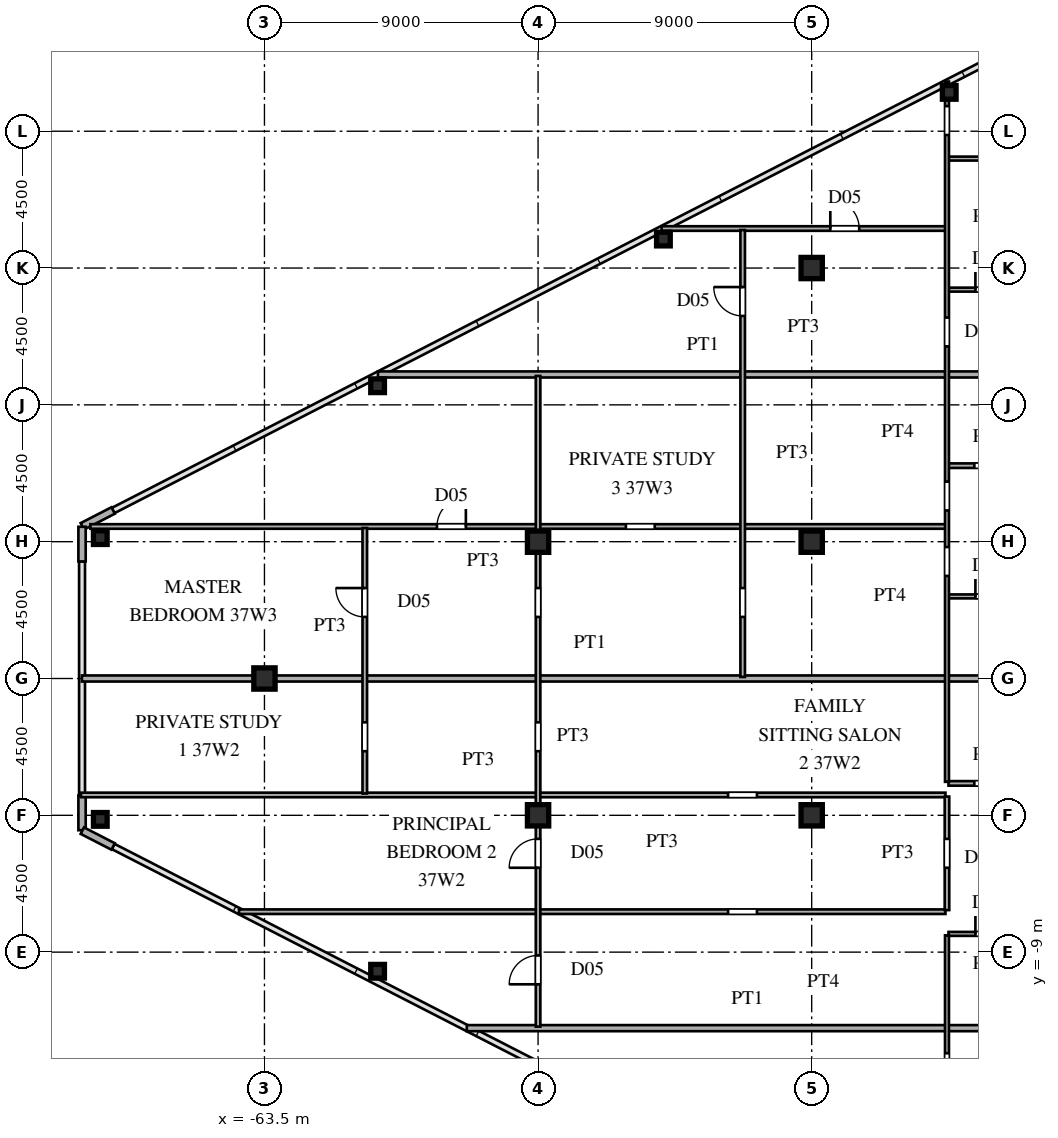
"""IFC4 building model, lengths in metres.
Left out: names, types, materials, properties, quantities, classifications, styles, units other than length and angle.
Written with IfcOpenShell. Run it as: python <this file> out.ifc"""

import sys

from ifc_helpers import new_model, si_unit, direction, frame, frame_2d, origin, origin_2d, place, context, subcontext, project, spatial, rectangle, hollow_rectangle, i_section, extrude, source, transform, mapped, element, fill, save


model = new_model("IFC4")
c1 = context("Model", 3, precision=1e-05, world=origin(), true_north=direction((0.0, 1.0)))
c2 = subcontext(c1, "Body", "Model", "MODEL_VIEW")
j1 = project(units=[si_unit("LENGTHUNIT", "METRE"), si_unit("PLANEANGLEUNIT", "RADIAN")], contexts=[c1])
p1 = place(None, origin())
s1 = spatial("IfcSite", under=j1, at=p1, CompositionType="ELEMENT")
p2 = place(p1, origin())
s2 = spatial("IfcBuilding", under=s1, at=p2, CompositionType="ELEMENT")
p3 = place(p2, frame((0.0, 0.0, 140.4)))
s3 = spatial("IfcBuildingStorey", under=s2, at=p3, CompositionType="ELEMENT", Elevation=140.4)
m1 = source(origin(), c2, "Body", "SweptSolid", [
    extrude(i_section(OverallWidth=0.7, OverallDepth=0.7, WebThickness=0.028, FlangeThickness=0.045, at=origin_2d()), origin(), (0.0, 0.0, 1.0), 3.6),
])
for number, where, z_axis, x_axis in (
    (1, (-45.5, -4.5, 0.0), (0.0, 0.0, 1.0), (1.0, 0.0, 0.0)),
    (2, (-45.5, 4.5, 0.0), (0.0, 0.0, 1.0), (1.0, 0.0, 0.0)),
    (3, (-45.5, 13.5, 0.0), (0.0, 0.0, 1.0), (1.0, 0.0, 0.0)),
    (4, (-54.5, -4.5, 0.0), (0.0, 0.0, 1.0), (1.0, 0.0, 0.0)),
    (5, (-54.5, 4.5, 0.0), (0.0, 0.0, 1.0), (1.0, 0.0, 0.0)),
    (6, (-63.5, 0.0, 0.0), (0.0, 0.0, 1.0), (1.0, 0.0, 0.0)),
):
    element("IfcColumn", number, at=place(p3, frame(where, z_axis=z_axis, x_axis=x_axis)), inside=s3, PredefinedType="COLUMN", context=c2, shape_type="MappedRepresentation", body=[
        mapped(m1, transform((0.0, 0.0, 0.0), scale=1.0)),
    ])
m2 = source(origin(), c2, "Body", "SweptSolid", [
    extrude(hollow_rectangle(XDim=0.45, YDim=0.45, WallThickness=0.018, at=origin_2d()), origin(), (0.0, 0.0, 1.0), 3.6),
])
for number, where, z_axis, x_axis in (
    (7, (-68.9, 4.634, 0.0), (0.0, 0.0, 1.0), (1.0, 0.0, 0.0)),
    (8, (-68.9, -4.634, 0.0), (0.0, 0.0, 1.0), (1.0, 0.0, 0.0)),
    (9, (-59.779, -9.629, 0.0), (0.0, 0.0, 1.0), (1.0, 0.0, 0.0)),
    (10, (-40.976, 19.278, 0.0), (0.0, 0.0, 1.0), (1.0, 0.0, 0.0)),
    (11, (-50.377, 14.453, 0.0), (0.0, 0.0, 1.0), (1.0, 0.0, 0.0)),
    (12, (-59.779, 9.629, 0.0), (0.0, 0.0, 1.0), (1.0, 0.0, 0.0)),
):
    element("IfcColumn", number, at=place(p3, frame(where, z_axis=z_axis, x_axis=x_axis)), inside=s3, PredefinedType="COLUMN", context=c2, shape_type="MappedRepresentation", body=[
        mapped(m2, transform((0.0, 0.0, 0.0), scale=1.0)),
    ])
p4 = place(p3, frame((-68.477, 5.525, 0.0), z_axis=(0.0, 0.0, 1.0), x_axis=(-0.889797395748, -0.456355776255, 0.0)))
e13 = element("IfcWall", 13, at=p4, inside=s3, PredefinedType="SOLIDWALL", context=c2, shape_type="SweptSolid", body=[
    extrude(rectangle(XDim=1.14, YDim=0.24, at=frame_2d((0.57, 0.0))), origin(), (0.0, 0.0, 1.0), 3.38),
])
for number, where, z_axis, x_axis in (
    (14, (-69.5, 4.99, 0.0), (0.0, 0.0, 1.0), (0.0, -1.0, 0.0)),
    (15, (-69.5, -3.85, 0.0), (0.0, 0.0, 1.0), (0.0, -1.0, 0.0)),
):
    element("IfcWall", number, at=place(p3, frame(where, z_axis=z_axis, x_axis=x_axis)), inside=s3, PredefinedType="SOLIDWALL", context=c2, shape_type="SweptSolid", body=[
        extrude(rectangle(XDim=1.14, YDim=0.24, at=frame_2d((0.57, 0.0))), origin(), (0.0, 0.0, 1.0), 3.38),
    ])
p5 = place(p3, frame((-69.491, -5.005, 0.0), z_axis=(0.0, 0.0, 1.0), x_axis=(0.889797395748, -0.456355776255, 0.0)))
e16 = element("IfcWall", 16, at=p5, inside=s3, PredefinedType="SOLIDWALL", context=c2, shape_type="SweptSolid", body=[
    extrude(rectangle(XDim=1.14, YDim=0.24, at=frame_2d((0.57, 0.0))), origin(), (0.0, 0.0, 1.0), 3.38),
])
p6 = place(p3, frame((-56.844, -11.5, 0.0), z_axis=(0.0, 0.0, 1.0), x_axis=(1.0, 0.0, 0.0)))
e17 = element("IfcWall", 17, at=p6, inside=s3, PredefinedType="PARTITIONING", context=c2, shape_type="SweptSolid", body=[
    extrude(rectangle(XDim=18.464, YDim=0.2, at=frame_2d((9.232, 0.0))), origin(), (0.0, 0.0, 1.0), 3.38),
])
p7 = place(p3, frame((-41.0, -8.4, 0.0), z_axis=(0.0, 0.0, 1.0), x_axis=(1.0, 0.0, 0.0)))
e18 = element("IfcWall", 18, at=p7, inside=s3, PredefinedType="PARTITIONING", context=c2, shape_type="SweptSolid", body=[
    extrude(rectangle(XDim=2.65, YDim=0.13, at=frame_2d((1.325, 0.0))), origin(), (0.0, 0.0, 1.0), 3.38),
])
p8 = place(p7, frame((0.885, 0.0, 0.0)))
e19 = element("IfcOpeningElement", 19, at=p8, cuts=e18, PredefinedType="OPENING", context=c2, shape_type="SweptSolid", body=[
    extrude(rectangle(XDim=0.88, YDim=2.1, at=frame_2d((0.44, 1.05))), frame((0.0, 0.075, 0.0), z_axis=(0.0, -1.0, 0.0), x_axis=(1.0, 0.0, 0.0)), (0.0, 0.0, 1.0), 0.15),
])
p9 = place(p3, frame((-64.338, -7.67, 0.0), z_axis=(0.0, 0.0, 1.0), x_axis=(1.0, 0.0, 0.0)))
e20 = element("IfcWall", 20, at=p9, inside=s3, PredefinedType="PARTITIONING", context=c2, shape_type="SweptSolid", body=[
    extrude(rectangle(XDim=23.238, YDim=0.15, at=frame_2d((11.619, 0.0))), origin(), (0.0, 0.0, 1.0), 3.38),
])
p10 = place(p9, frame((16.088, 0.0, 0.0)))
e21 = element("IfcOpeningElement", 21, at=p10, cuts=e20, PredefinedType="OPENING", context=c2, shape_type="SweptSolid", body=[
    extrude(rectangle(XDim=0.95, YDim=2.15, at=frame_2d((0.475, 1.075))), frame((0.0, 0.085, 0.0), z_axis=(0.0, -1.0, 0.0), x_axis=(1.0, 0.0, 0.0)), (0.0, 0.0, 1.0), 0.17),
])
p11 = place(p3, frame((-69.535, -3.83, 0.0), z_axis=(0.0, 0.0, 1.0), x_axis=(1.0, 0.0, 0.0)))
e22 = element("IfcWall", 22, at=p11, inside=s3, PredefinedType="PARTITIONING", context=c2, shape_type="SweptSolid", body=[
    extrude(rectangle(XDim=28.435, YDim=0.15, at=frame_2d((14.217, 0.0))), origin(), (0.0, 0.0, 1.0), 3.38),
])
p12 = place(p11, frame((21.285, 0.0, 0.0)))
e23 = element("IfcOpeningElement", 23, at=p12, cuts=e22, PredefinedType="OPENING", context=c2, shape_type="SweptSolid", body=[
    extrude(rectangle(XDim=0.95, YDim=2.15, at=frame_2d((0.475, 1.075))), frame((0.0, 0.085, 0.0), z_axis=(0.0, -1.0, 0.0), x_axis=(1.0, 0.0, 0.0)), (0.0, 0.0, 1.0), 0.17),
])
p13 = place(p3, frame((-41.0, -3.45, 0.0), z_axis=(0.0, 0.0, 1.0), x_axis=(1.0, 0.0, 0.0)))
e24 = element("IfcWall", 24, at=p13, inside=s3, PredefinedType="PARTITIONING", context=c2, shape_type="SweptSolid", body=[
    extrude(rectangle(XDim=2.65, YDim=0.15, at=frame_2d((1.325, 0.0))), origin(), (0.0, 0.0, 1.0), 3.38),
])
p14 = place(p13, frame((0.85, 0.0, 0.0)))
e25 = element("IfcOpeningElement", 25, at=p14, cuts=e24, PredefinedType="OPENING", context=c2, shape_type="SweptSolid", body=[
    extrude(rectangle(XDim=0.95, YDim=2.15, at=frame_2d((0.475, 1.075))), frame((0.0, 0.085, 0.0), z_axis=(0.0, -1.0, 0.0), x_axis=(1.0, 0.0, 0.0)), (0.0, 0.0, 1.0), 0.17),
])
p15 = place(p3, frame((-69.505, 0.0, 0.0), z_axis=(0.0, 0.0, 1.0), x_axis=(1.0, 0.0, 0.0)))
e26 = element("IfcWall", 26, at=p15, inside=s3, PredefinedType="PARTITIONING", context=c2, shape_type="SweptSolid", body=[
    extrude(rectangle(XDim=31.125, YDim=0.2, at=frame_2d((15.562, 0.0))), origin(), (0.0, 0.0, 1.0), 3.38),
])
p16 = place(p3, frame((-41.0, 2.7, 0.0), z_axis=(0.0, 0.0, 1.0), x_axis=(1.0, 0.0, 0.0)))
e27 = element("IfcWall", 27, at=p16, inside=s3, PredefinedType="PARTITIONING", context=c2, shape_type="SweptSolid", body=[
    extrude(rectangle(XDim=2.65, YDim=0.13, at=frame_2d((1.325, 0.0))), origin(), (0.0, 0.0, 1.0), 3.38),
])
p17 = place(p16, frame((0.885, 0.0, 0.0)))
e28 = element("IfcOpeningElement", 28, at=p17, cuts=e27, PredefinedType="OPENING", context=c2, shape_type="SweptSolid", body=[
    extrude(rectangle(XDim=0.88, YDim=2.1, at=frame_2d((0.44, 1.05))), frame((0.0, 0.075, 0.0), z_axis=(0.0, -1.0, 0.0), x_axis=(1.0, 0.0, 0.0)), (0.0, 0.0, 1.0), 0.15),
])
p18 = place(p3, frame((-69.226, 5.0, 0.0), z_axis=(0.0, 0.0, 1.0), x_axis=(1.0, 0.0, 0.0)))
e29 = element("IfcWall", 29, at=p18, inside=s3, PredefinedType="PARTITIONING", context=c2, shape_type="SweptSolid", body=[
    extrude(rectangle(XDim=28.126, YDim=0.15, at=frame_2d((14.063, 0.0))), origin(), (0.0, 0.0, 1.0), 3.38),
])
p19 = place(p18, frame((11.401, 0.0, 0.0)))
e30 = element("IfcOpeningElement", 30, at=p19, cuts=e29, PredefinedType="OPENING", context=c2, shape_type="SweptSolid", body=[
    extrude(rectangle(XDim=0.95, YDim=2.15, at=frame_2d((0.475, 1.075))), frame((0.0, 0.085, 0.0), z_axis=(0.0, -1.0, 0.0), x_axis=(1.0, 0.0, 0.0)), (0.0, 0.0, 1.0), 0.17),
])
p20 = place(p18, frame((17.614, 0.0, 0.0)))
e31 = element("IfcOpeningElement", 31, at=p20, cuts=e29, PredefinedType="OPENING", context=c2, shape_type="SweptSolid", body=[
    extrude(rectangle(XDim=0.95, YDim=2.15, at=frame_2d((0.475, 1.075))), frame((0.0, 0.085, 0.0), z_axis=(0.0, -1.0, 0.0), x_axis=(1.0, 0.0, 0.0)), (0.0, 0.0, 1.0), 0.17),
])
p21 = place(p3, frame((-41.0, 7.0, 0.0), z_axis=(0.0, 0.0, 1.0), x_axis=(1.0, 0.0, 0.0)))
e32 = element("IfcWall", 32, at=p21, inside=s3, PredefinedType="PARTITIONING", context=c2, shape_type="SweptSolid", body=[
    extrude(rectangle(XDim=2.65, YDim=0.15, at=frame_2d((1.325, 0.0))), origin(), (0.0, 0.0, 1.0), 3.38),
])
p22 = place(p21, frame((0.85, 0.0, 0.0)))
e33 = element("IfcOpeningElement", 33, at=p22, cuts=e32, PredefinedType="OPENING", context=c2, shape_type="SweptSolid", body=[
    extrude(rectangle(XDim=0.95, YDim=2.15, at=frame_2d((0.475, 1.075))), frame((0.0, 0.085, 0.0), z_axis=(0.0, -1.0, 0.0), x_axis=(1.0, 0.0, 0.0)), (0.0, 0.0, 1.0), 0.17),
])
p23 = place(p3, frame((-59.767, 10.0, 0.0), z_axis=(0.0, 0.0, 1.0), x_axis=(1.0, 0.0, 0.0)))
e34 = element("IfcWall", 34, at=p23, inside=s3, PredefinedType="PARTITIONING", context=c2, shape_type="SweptSolid", body=[
    extrude(rectangle(XDim=21.387, YDim=0.2, at=frame_2d((10.694, 0.0))), origin(), (0.0, 0.0, 1.0), 3.38),
])
p24 = place(p3, frame((-41.0, 12.79, 0.0), z_axis=(0.0, 0.0, 1.0), x_axis=(1.0, 0.0, 0.0)))
e35 = element("IfcWall", 35, at=p24, inside=s3, PredefinedType="PARTITIONING", context=c2, shape_type="SweptSolid", body=[
    extrude(rectangle(XDim=2.65, YDim=0.13, at=frame_2d((1.325, 0.0))), origin(), (0.0, 0.0, 1.0), 3.38),
])
p25 = place(p24, frame((0.885, 0.0, 0.0)))
e36 = element("IfcOpeningElement", 36, at=p25, cuts=e35, PredefinedType="OPENING", context=c2, shape_type="SweptSolid", body=[
    extrude(rectangle(XDim=0.88, YDim=2.1, at=frame_2d((0.44, 1.05))), frame((0.0, 0.075, 0.0), z_axis=(0.0, -1.0, 0.0), x_axis=(1.0, 0.0, 0.0)), (0.0, 0.0, 1.0), 0.15),
])
p26 = place(p3, frame((-50.438, 14.8, 0.0), z_axis=(0.0, 0.0, 1.0), x_axis=(1.0, 0.0, 0.0)))
e37 = element("IfcWall", 37, at=p26, inside=s3, PredefinedType="PARTITIONING", context=c2, shape_type="SweptSolid", body=[
    extrude(rectangle(XDim=9.338, YDim=0.15, at=frame_2d((4.669, 0.0))), origin(), (0.0, 0.0, 1.0), 3.38),
])
p27 = place(p26, frame((5.551, 0.0, 0.0)))
e38 = element("IfcOpeningElement", 38, at=p27, cuts=e37, PredefinedType="OPENING", context=c2, shape_type="SweptSolid", body=[
    extrude(rectangle(XDim=0.95, YDim=2.15, at=frame_2d((0.475, 1.075))), frame((0.0, 0.085, 0.0), z_axis=(0.0, -1.0, 0.0), x_axis=(1.0, 0.0, 0.0)), (0.0, 0.0, 1.0), 0.17),
])
p28 = place(p3, frame((-41.0, 17.1, 0.0), z_axis=(0.0, 0.0, 1.0), x_axis=(1.0, 0.0, 0.0)))
e39 = element("IfcWall", 39, at=p28, inside=s3, PredefinedType="PARTITIONING", context=c2, shape_type="SweptSolid", body=[
    extrude(rectangle(XDim=4.45, YDim=0.13, at=frame_2d((2.225, 0.0))), origin(), (0.0, 0.0, 1.0), 3.38),
])
p29 = place(p3, frame((-60.2, -3.783, 0.0), z_axis=(0.0, 0.0, 1.0), x_axis=(0.0, 1.0, 0.0)))
e40 = element("IfcWall", 40, at=p29, inside=s3, PredefinedType="PARTITIONING", context=c2, shape_type="SweptSolid", body=[
    extrude(rectangle(XDim=8.733, YDim=0.15, at=frame_2d((4.366, 0.0))), origin(), (0.0, 0.0, 1.0), 3.38),
])
p30 = place(p29, frame((1.391, 0.0, 0.0)))
e41 = element("IfcOpeningElement", 41, at=p30, cuts=e40, PredefinedType="OPENING", context=c2, shape_type="SweptSolid", body=[
    extrude(rectangle(XDim=0.95, YDim=2.15, at=frame_2d((0.475, 1.075))), frame((0.0, 0.085, 0.0), z_axis=(0.0, -1.0, 0.0), x_axis=(1.0, 0.0, 0.0)), (0.0, 0.0, 1.0), 0.17),
])
p31 = place(p29, frame((5.808, 0.0, 0.0)))
e42 = element("IfcOpeningElement", 42, at=p31, cuts=e40, PredefinedType="OPENING", context=c2, shape_type="SweptSolid", body=[
    extrude(rectangle(XDim=0.95, YDim=2.15, at=frame_2d((0.475, 1.075))), frame((0.0, 0.085, 0.0), z_axis=(0.0, -1.0, 0.0), x_axis=(1.0, 0.0, 0.0)), (0.0, 0.0, 1.0), 0.17),
])
p32 = place(p3, frame((-54.5, -11.45, 0.0), z_axis=(0.0, 0.0, 1.0), x_axis=(0.0, 1.0, 0.0)))
e43 = element("IfcWall", 43, at=p32, inside=s3, PredefinedType="PARTITIONING", context=c2, shape_type="SweptSolid", body=[
    extrude(rectangle(XDim=21.4, YDim=0.15, at=frame_2d((10.7, 0.0))), origin(), (0.0, 0.0, 1.0), 2.78),
])
p33 = place(p32, frame((5.225, 0.0, 0.0)))
e44 = element("IfcOpeningElement", 44, at=p33, cuts=e43, PredefinedType="OPENING", context=c2, shape_type="SweptSolid", body=[
    extrude(rectangle(XDim=0.95, YDim=2.15, at=frame_2d((0.475, 1.075))), frame((0.0, 0.085, 0.0), z_axis=(0.0, -1.0, 0.0), x_axis=(1.0, 0.0, 0.0)), (0.0, 0.0, 1.0), 0.17),
])
p34 = place(p32, frame((1.392, 0.0, 0.0)))
e45 = element("IfcOpeningElement", 45, at=p34, cuts=e43, PredefinedType="OPENING", context=c2, shape_type="SweptSolid", body=[
    extrude(rectangle(XDim=0.95, YDim=2.15, at=frame_2d((0.475, 1.075))), frame((0.0, 0.085, 0.0), z_axis=(0.0, -1.0, 0.0), x_axis=(1.0, 0.0, 0.0)), (0.0, 0.0, 1.0), 0.17),
])
p35 = place(p32, frame((9.058, 0.0, 0.0)))
e46 = element("IfcOpeningElement", 46, at=p35, cuts=e43, PredefinedType="OPENING", context=c2, shape_type="SweptSolid", body=[
    extrude(rectangle(XDim=0.95, YDim=2.15, at=frame_2d((0.475, 1.075))), frame((0.0, 0.085, 0.0), z_axis=(0.0, -1.0, 0.0), x_axis=(1.0, 0.0, 0.0)), (0.0, 0.0, 1.0), 0.17),
])
p36 = place(p32, frame((13.475, 0.0, 0.0)))
e47 = element("IfcOpeningElement", 47, at=p36, cuts=e43, PredefinedType="OPENING", context=c2, shape_type="SweptSolid", body=[
    extrude(rectangle(XDim=0.95, YDim=2.15, at=frame_2d((0.475, 1.075))), frame((0.0, 0.085, 0.0), z_axis=(0.0, -1.0, 0.0), x_axis=(1.0, 0.0, 0.0)), (0.0, 0.0, 1.0), 0.17),
])
p37 = place(p3, frame((-47.77, 0.05, 0.0), z_axis=(0.0, 0.0, 1.0), x_axis=(0.0, 1.0, 0.0)))
e48 = element("IfcWall", 48, at=p37, inside=s3, PredefinedType="PARTITIONING", context=c2, shape_type="SweptSolid", body=[
    extrude(rectangle(XDim=14.7, YDim=0.15, at=frame_2d((7.35, 0.0))), origin(), (0.0, 0.0, 1.0), 3.38),
])
p38 = place(p37, frame((1.975, 0.0, 0.0)))
e49 = element("IfcOpeningElement", 49, at=p38, cuts=e48, PredefinedType="OPENING", context=c2, shape_type="SweptSolid", body=[
    extrude(rectangle(XDim=0.95, YDim=2.15, at=frame_2d((0.475, 1.075))), frame((0.0, 0.085, 0.0), z_axis=(0.0, -1.0, 0.0), x_axis=(1.0, 0.0, 0.0)), (0.0, 0.0, 1.0), 0.17),
])
p39 = place(p37, frame((11.875, 0.0, 0.0)))
e50 = element("IfcOpeningElement", 50, at=p39, cuts=e48, PredefinedType="OPENING", context=c2, shape_type="SweptSolid", body=[
    extrude(rectangle(XDim=0.95, YDim=2.15, at=frame_2d((0.475, 1.075))), frame((0.0, 0.085, 0.0), z_axis=(0.0, -1.0, 0.0), x_axis=(1.0, 0.0, 0.0)), (0.0, 0.0, 1.0), 0.17),
])
p40 = place(p3, frame((-41.05, -19.634, 0.0), z_axis=(0.0, 0.0, 1.0), x_axis=(0.0, 1.0, 0.0)))
e51 = element("IfcWall", 51, at=p40, inside=s3, PredefinedType="PARTITIONING", context=c2, shape_type="SweptSolid", body=[
    extrude(rectangle(XDim=11.187, YDim=0.13, at=frame_2d((5.594, 0.0))), origin(), (0.0, 0.0, 1.0), 2.99),
])
p41 = place(p40, frame((6.359, 0.0, 0.0)))
e52 = element("IfcOpeningElement", 52, at=p41, cuts=e51, PredefinedType="OPENING", context=c2, shape_type="SweptSolid", body=[
    extrude(rectangle(XDim=0.95, YDim=2.15, at=frame_2d((0.475, 1.075))), frame((0.0, 0.075, 0.0), z_axis=(0.0, -1.0, 0.0), x_axis=(1.0, 0.0, 0.0)), (0.0, 0.0, 1.0), 0.15),
])
p42 = place(p40, frame((0.809, 0.0, 0.0)))
e53 = element("IfcOpeningElement", 53, at=p42, cuts=e51, PredefinedType="OPENING", context=c2, shape_type="SweptSolid", body=[
    extrude(rectangle(XDim=0.95, YDim=2.15, at=frame_2d((0.475, 1.075))), frame((0.0, 0.075, 0.0), z_axis=(0.0, -1.0, 0.0), x_axis=(1.0, 0.0, 0.0)), (0.0, 0.0, 1.0), 0.15),
])
p43 = place(p3, frame((-41.05, -7.617, 0.0), z_axis=(0.0, 0.0, 1.0), x_axis=(0.0, 1.0, 0.0)))
e54 = element("IfcWall", 54, at=p43, inside=s3, PredefinedType="PARTITIONING", context=c2, shape_type="SweptSolid", body=[
    extrude(rectangle(XDim=3.734, YDim=0.15, at=frame_2d((1.867, 0.0))), origin(), (0.0, 0.0, 1.0), 2.99),
])
p44 = place(p43, frame((1.392, 0.0, 0.0)))
e55 = element("IfcOpeningElement", 55, at=p44, cuts=e54, PredefinedType="OPENING", context=c2, shape_type="SweptSolid", body=[
    extrude(rectangle(XDim=0.95, YDim=2.15, at=frame_2d((0.475, 1.075))), frame((0.0, 0.085, 0.0), z_axis=(0.0, -1.0, 0.0), x_axis=(1.0, 0.0, 0.0)), (0.0, 0.0, 1.0), 0.17),
])
p45 = place(p3, frame((-41.05, -3.398, 0.0), z_axis=(0.0, 0.0, 1.0), x_axis=(0.0, 1.0, 0.0)))
e56 = element("IfcWall", 56, at=p45, inside=s3, PredefinedType="PARTITIONING", context=c2, shape_type="SweptSolid", body=[
    extrude(rectangle(XDim=23.032, YDim=0.13, at=frame_2d((11.516, 0.0))), origin(), (0.0, 0.0, 1.0), 2.99),
])
p46 = place(p45, frame((6.772, 0.0, 0.0)))
e57 = element("IfcOpeningElement", 57, at=p46, cuts=e56, PredefinedType="OPENING", context=c2, shape_type="SweptSolid", body=[
    extrude(rectangle(XDim=0.95, YDim=2.15, at=frame_2d((0.475, 1.075))), frame((0.0, 0.075, 0.0), z_axis=(0.0, -1.0, 0.0), x_axis=(1.0, 0.0, 0.0)), (0.0, 0.0, 1.0), 0.15),
])
p47 = place(p45, frame((8.924, 0.0, 0.0)))
e58 = element("IfcOpeningElement", 58, at=p47, cuts=e56, PredefinedType="OPENING", context=c2, shape_type="SweptSolid", body=[
    extrude(rectangle(XDim=0.95, YDim=2.15, at=frame_2d((0.475, 1.075))), frame((0.0, 0.075, 0.0), z_axis=(0.0, -1.0, 0.0), x_axis=(1.0, 0.0, 0.0)), (0.0, 0.0, 1.0), 0.15),
])
p48 = place(p45, frame((14.321, 0.0, 0.0)))
e59 = element("IfcOpeningElement", 59, at=p48, cuts=e56, PredefinedType="OPENING", context=c2, shape_type="SweptSolid", body=[
    extrude(rectangle(XDim=0.95, YDim=2.15, at=frame_2d((0.475, 1.075))), frame((0.0, 0.075, 0.0), z_axis=(0.0, -1.0, 0.0), x_axis=(1.0, 0.0, 0.0)), (0.0, 0.0, 1.0), 0.15),
])
p49 = place(p45, frame((21.273, 0.0, 0.0)))
e60 = element("IfcOpeningElement", 60, at=p49, cuts=e56, PredefinedType="OPENING", context=c2, shape_type="SweptSolid", body=[
    extrude(rectangle(XDim=0.95, YDim=2.15, at=frame_2d((0.475, 1.075))), frame((0.0, 0.075, 0.0), z_axis=(0.0, -1.0, 0.0), x_axis=(1.0, 0.0, 0.0)), (0.0, 0.0, 1.0), 0.15),
])
m3 = source(origin(), c2, "Body", "SweptSolid", [
    extrude(rectangle(XDim=0.88, YDim=2.1, at=frame_2d((0.44, 1.05))), frame((0.0, 0.025, 0.0), z_axis=(0.0, -1.0, 0.0), x_axis=(1.0, 0.0, 0.0)), (0.0, 0.0, 1.0), 0.05),
])
p50 = place(p8, origin())
e61 = element("IfcDoor", 61, at=p50, inside=s3, OperationType="SINGLE_SWING_LEFT", PredefinedType="DOOR", context=c2, shape_type="MappedRepresentation", body=[
    mapped(m3, transform((0.0, 0.0, 0.0), scale=1.0)),
])
fill(e19, e61)
p51 = place(p17, origin())
e62 = element("IfcDoor", 62, at=p51, inside=s3, OperationType="SINGLE_SWING_LEFT", PredefinedType="DOOR", context=c2, shape_type="MappedRepresentation", body=[
    mapped(m3, transform((0.0, 0.0, 0.0), scale=1.0)),
])
fill(e28, e62)
m4 = source(origin(), c2, "Body", "SweptSolid", [
    extrude(rectangle(XDim=0.95, YDim=2.15, at=frame_2d((0.475, 1.075))), frame((0.0, 0.025, 0.0), z_axis=(0.0, -1.0, 0.0), x_axis=(1.0, 0.0, 0.0)), (0.0, 0.0, 1.0), 0.05),
])
p52 = place(p19, origin())
e63 = element("IfcDoor", 63, at=p52, inside=s3, OperationType="SINGLE_SWING_RIGHT", PredefinedType="DOOR", context=c2, shape_type="MappedRepresentation", body=[
    mapped(m4, transform((0.0, 0.0, 0.0), scale=1.0)),
])
fill(e30, e63)
p53 = place(p25, origin())
e64 = element("IfcDoor", 64, at=p53, inside=s3, OperationType="SINGLE_SWING_LEFT", PredefinedType="DOOR", context=c2, shape_type="MappedRepresentation", body=[
    mapped(m3, transform((0.0, 0.0, 0.0), scale=1.0)),
])
fill(e36, e64)
p54 = place(p27, origin())
e65 = element("IfcDoor", 65, at=p54, inside=s3, OperationType="SINGLE_SWING_LEFT", PredefinedType="DOOR", context=c2, shape_type="MappedRepresentation", body=[
    mapped(m4, transform((0.0, 0.0, 0.0), scale=1.0)),
])
fill(e38, e65)
p55 = place(p31, origin())
e66 = element("IfcDoor", 66, at=p55, inside=s3, OperationType="SINGLE_SWING_RIGHT", PredefinedType="DOOR", context=c2, shape_type="MappedRepresentation", body=[
    mapped(m4, transform((0.0, 0.0, 0.0), scale=1.0)),
])
fill(e42, e66)
p56 = place(p33, origin())
e67 = element("IfcDoor", 67, at=p56, inside=s3, OperationType="SINGLE_SWING_LEFT", PredefinedType="DOOR", context=c2, shape_type="MappedRepresentation", body=[
    mapped(m4, transform((0.0, 0.0, 0.0), scale=1.0)),
])
fill(e44, e67)
p57 = place(p34, origin())
e68 = element("IfcDoor", 68, at=p57, inside=s3, OperationType="SINGLE_SWING_LEFT", PredefinedType="DOOR", context=c2, shape_type="MappedRepresentation", body=[
    mapped(m4, transform((0.0, 0.0, 0.0), scale=1.0)),
])
fill(e45, e68)
p58 = place(p39, origin())
e69 = element("IfcDoor", 69, at=p58, inside=s3, OperationType="SINGLE_SWING_RIGHT", PredefinedType="DOOR", context=c2, shape_type="MappedRepresentation", body=[
    mapped(m4, transform((0.0, 0.0, 0.0), scale=1.0)),
])
fill(e50, e69)
save(model, sys.argv[1])
